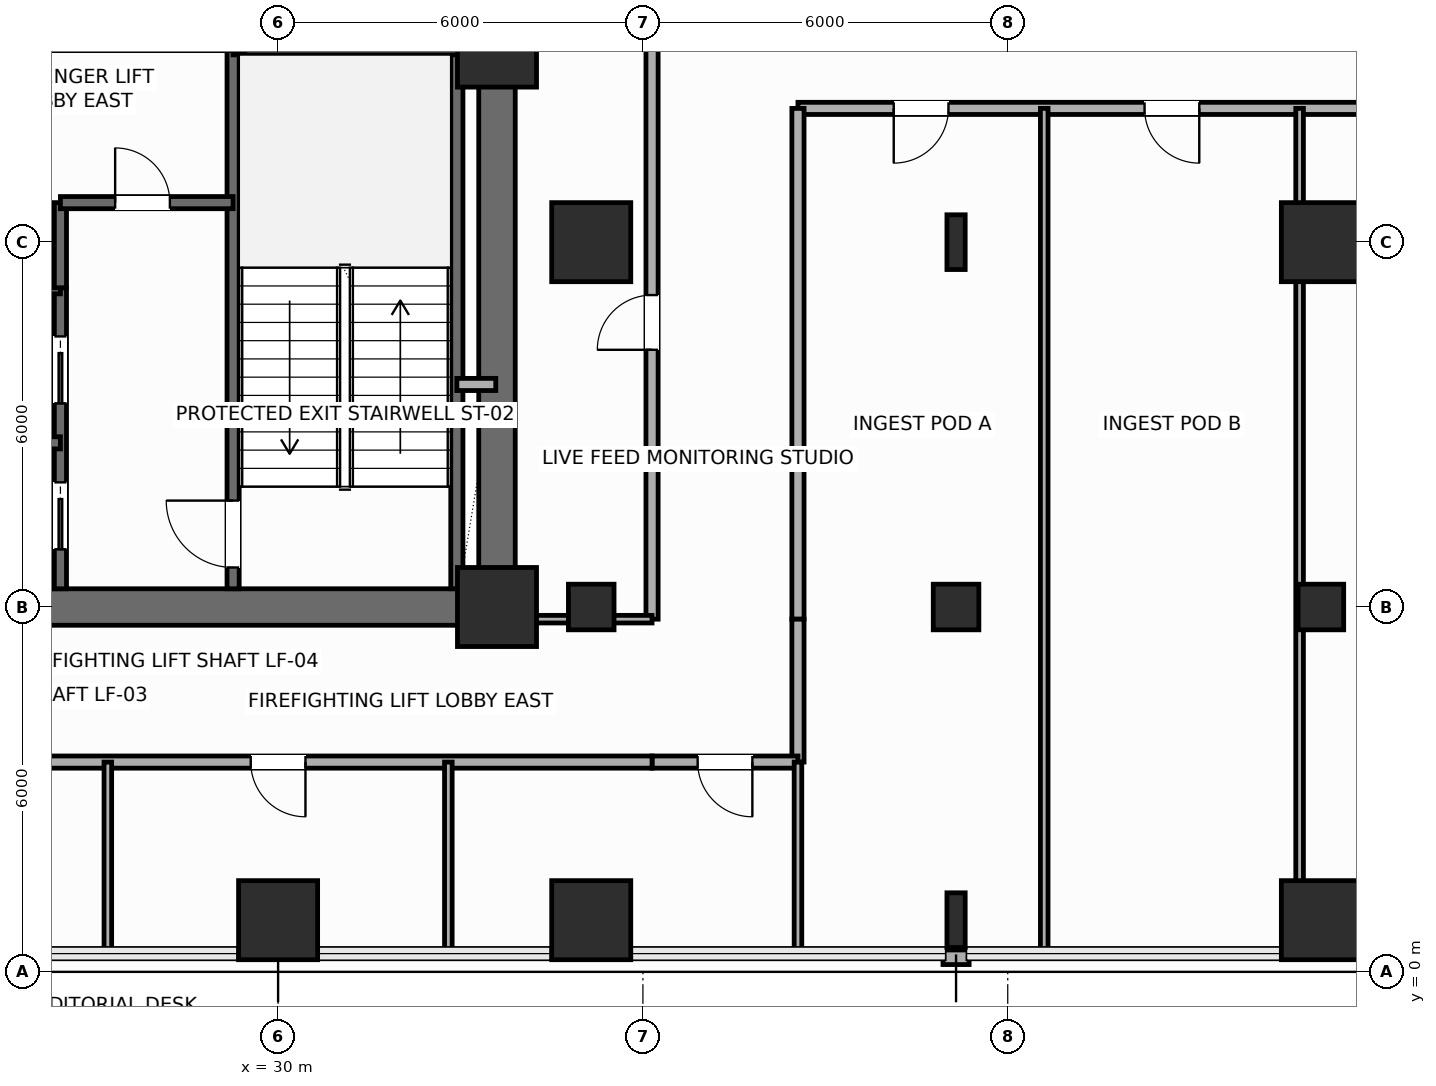
"""IFC4 building model, lengths in metres.
Left out: names, types, materials, properties, quantities, classifications, styles, units other than length and angle.
Written with IfcOpenShell. Run it as: python <this file> out.ifc"""

import sys

from ifc_helpers import new_model, si_unit, direction, frame, frame_2d, origin, origin_2d, place, context, subcontext, project, spatial, rectangle, hollow_rectangle, i_section, extrude, element, fill, save


model = new_model("IFC4")
c1 = context("Model", 3, precision=1e-05, world=origin(), true_north=direction((0.0, 1.0)))
c2 = subcontext(c1, "Body", "Model", "MODEL_VIEW")
j1 = project(units=[si_unit("LENGTHUNIT", "METRE"), si_unit("PLANEANGLEUNIT", "RADIAN")], contexts=[c1])
p1 = place(None, origin())
s1 = spatial("IfcSite", under=j1, at=p1, CompositionType="ELEMENT")
p2 = place(p1, origin())
s2 = spatial("IfcBuilding", under=s1, at=p2, CompositionType="ELEMENT")
p3 = place(p2, frame((0.0, 0.0, 48.0)))
s3 = spatial("IfcBuildingStorey", under=s2, at=p3, CompositionType="ELEMENT", Elevation=48.0)
for number, where, z_axis, x_axis in (
    (1, (33.6, 6.0, 0.0), (0.0, 0.0, 1.0), (1.0, 0.0, 0.0)),
    (2, (33.6, 15.2, 0.0), (0.0, 0.0, 1.0), (1.0, 0.0, 0.0)),
    (3, (30.0, 0.85, 0.0), (0.0, 0.0, 1.0), (1.0, 0.0, 0.0)),
    (4, (35.15, 0.85, 0.0), (0.0, 0.0, 1.0), (1.0, 0.0, 0.0)),
):
    element("IfcColumn", number, at=place(p3, frame(where, z_axis=z_axis, x_axis=x_axis)), inside=s3, PredefinedType="COLUMN", context=c2, shape_type="SweptSolid", body=[
        extrude(rectangle(XDim=1.3, YDim=1.3, at=origin_2d()), origin(), (0.0, 0.0, 1.0), 3.9),
    ])
p4 = place(p3, frame((35.15, 6.0, 0.0), z_axis=(0.0, 0.0, 1.0), x_axis=(1.0, 0.0, 0.0)))
e5 = element("IfcColumn", 5, at=p4, inside=s3, PredefinedType="COLUMN", context=c2, shape_type="SweptSolid", body=[
    extrude(hollow_rectangle(XDim=0.75, YDim=0.75, WallThickness=0.035, InnerFilletRadius=0.035, OuterFilletRadius=0.05, at=origin_2d()), origin(), (0.0, 0.0, 1.0), 3.9),
])
p5 = place(p3, frame((35.15, 12.0, 0.0), z_axis=(0.0, 0.0, 1.0), x_axis=(1.0, 0.0, 0.0)))
e6 = element("IfcColumn", 6, at=p5, inside=s3, PredefinedType="COLUMN", context=c2, shape_type="SweptSolid", body=[
    extrude(rectangle(XDim=1.3, YDim=1.3, at=origin_2d()), origin(), (0.0, 0.0, 1.0), 3.9),
])
p6 = place(p3, frame((41.15, 0.85, 0.0), z_axis=(0.0, 0.0, 1.0), x_axis=(1.0, 0.0, 0.0)))
e7 = element("IfcColumn", 7, at=p6, inside=s3, PredefinedType="COLUMN", context=c2, shape_type="SweptSolid", body=[
    extrude(i_section(OverallWidth=0.3, OverallDepth=0.9, WebThickness=0.019, FlangeThickness=0.035, FilletRadius=0.03, at=origin_2d()), origin(), (0.0, 0.0, 1.0), 3.9),
])
p7 = place(p3, frame((41.15, 6.0, 0.0), z_axis=(0.0, 0.0, 1.0), x_axis=(1.0, 0.0, 0.0)))
e8 = element("IfcColumn", 8, at=p7, inside=s3, PredefinedType="COLUMN", context=c2, shape_type="SweptSolid", body=[
    extrude(hollow_rectangle(XDim=0.75, YDim=0.75, WallThickness=0.035, InnerFilletRadius=0.035, OuterFilletRadius=0.05, at=origin_2d()), origin(), (0.0, 0.0, 1.0), 3.9),
])
p8 = place(p3, frame((41.15, 12.0, 0.0), z_axis=(0.0, 0.0, 1.0), x_axis=(1.0, 0.0, 0.0)))
e9 = element("IfcColumn", 9, at=p8, inside=s3, PredefinedType="COLUMN", context=c2, shape_type="SweptSolid", body=[
    extrude(i_section(OverallWidth=0.3, OverallDepth=0.9, WebThickness=0.019, FlangeThickness=0.035, FilletRadius=0.03, at=origin_2d()), origin(), (0.0, 0.0, 1.0), 3.9),
])
p9 = place(p3, frame((47.15, 0.85, 0.0), z_axis=(0.0, 0.0, 1.0), x_axis=(1.0, 0.0, 0.0)))
e10 = element("IfcColumn", 10, at=p9, inside=s3, PredefinedType="COLUMN", context=c2, shape_type="SweptSolid", body=[
    extrude(rectangle(XDim=1.3, YDim=1.3, at=origin_2d()), origin(), (0.0, 0.0, 1.0), 3.9),
])
p10 = place(p3, frame((47.15, 6.0, 0.0), z_axis=(0.0, 0.0, 1.0), x_axis=(1.0, 0.0, 0.0)))
e11 = element("IfcColumn", 11, at=p10, inside=s3, PredefinedType="COLUMN", context=c2, shape_type="SweptSolid", body=[
    extrude(hollow_rectangle(XDim=0.75, YDim=0.75, WallThickness=0.035, InnerFilletRadius=0.035, OuterFilletRadius=0.05, at=origin_2d()), origin(), (0.0, 0.0, 1.0), 3.9),
])
p11 = place(p3, frame((47.15, 12.0, 0.0), z_axis=(0.0, 0.0, 1.0), x_axis=(1.0, 0.0, 0.0)))
e12 = element("IfcColumn", 12, at=p11, inside=s3, PredefinedType="COLUMN", context=c2, shape_type="SweptSolid", body=[
    extrude(rectangle(XDim=1.3, YDim=1.3, at=origin_2d()), origin(), (0.0, 0.0, 1.0), 3.9),
])
p12 = place(p3, frame((41.365, 0.24, 0.0), z_axis=(0.0, 0.0, 1.0), x_axis=(-1.0, 0.0, 0.0)))
e13 = element("IfcWall", 13, at=p12, inside=s3, PredefinedType="SOLIDWALL", context=c2, shape_type="SweptSolid", body=[
    extrude(rectangle(XDim=0.43, YDim=0.24, at=frame_2d((0.215, 0.0))), origin(), (0.0, 0.0, 1.0), 3.65),
])
p13 = place(p3, frame((24.0, 6.0, 0.0), z_axis=(0.0, 0.0, 1.0), x_axis=(1.0, 0.0, 0.0)))
e14 = element("IfcWall", 14, at=p13, inside=s3, PredefinedType="SHEAR", context=c2, shape_type="SweptSolid", body=[
    extrude(rectangle(XDim=9.6, YDim=0.6, at=frame_2d((4.8, 0.0))), origin(), (0.0, 0.0, 1.0), 3.65),
])
p14 = place(p3, frame((33.6, 6.0, 0.0), z_axis=(0.0, 0.0, 1.0), x_axis=(0.0, 1.0, 0.0)))
e15 = element("IfcWall", 15, at=p14, inside=s3, PredefinedType="SHEAR", context=c2, shape_type="SweptSolid", body=[
    extrude(rectangle(XDim=12.0, YDim=0.6, at=frame_2d((6.0, 0.0))), origin(), (0.0, 0.0, 1.0), 3.65),
])
p15 = place(p14, frame((10.2, 0.0, 0.0)))
e16 = element("IfcOpeningElement", 16, at=p15, cuts=e15, PredefinedType="OPENING", context=c2, shape_type="SweptSolid", body=[
    extrude(rectangle(XDim=0.9, YDim=2.15, at=frame_2d((0.45, 1.075))), frame((0.0, 0.31, 0.0), z_axis=(0.0, -1.0, 0.0), x_axis=(1.0, 0.0, 0.0)), (0.0, 0.0, 1.0), 0.62),
])
p16 = place(p3, frame((29.26, 6.3, 0.0), z_axis=(0.0, 0.0, 1.0), x_axis=(0.0, 1.0, 0.0)))
e17 = element("IfcWall", 17, at=p16, inside=s3, PredefinedType="SHEAR", context=c2, shape_type="SweptSolid", body=[
    extrude(rectangle(XDim=8.88, YDim=0.2, at=frame_2d((4.44, 0.0))), origin(), (0.0, 0.0, 1.0), 3.65),
])
p17 = place(p16, frame((0.35, 0.0, 0.0)))
e18 = element("IfcOpeningElement", 18, at=p17, cuts=e17, PredefinedType="OPENING", context=c2, shape_type="SweptSolid", body=[
    extrude(rectangle(XDim=1.1, YDim=2.2, at=frame_2d((0.55, 1.1))), frame((0.0, 0.11, 0.0), z_axis=(0.0, -1.0, 0.0), x_axis=(1.0, 0.0, 0.0)), (0.0, 0.0, 1.0), 0.22),
])
p18 = place(p3, frame((32.94, 6.3, 0.0), z_axis=(0.0, 0.0, 1.0), x_axis=(0.0, 1.0, 0.0)))
e19 = element("IfcWall", 19, at=p18, inside=s3, PredefinedType="SHEAR", context=c2, shape_type="SweptSolid", body=[
    extrude(rectangle(XDim=8.88, YDim=0.2, at=frame_2d((4.44, 0.0))), origin(), (0.0, 0.0, 1.0), 3.65),
])
p19 = place(p3, frame((29.26, 15.18, 0.0), z_axis=(0.0, 0.0, 1.0), x_axis=(1.0, 0.0, 0.0)))
e20 = element("IfcWall", 20, at=p19, inside=s3, PredefinedType="SHEAR", context=c2, shape_type="SweptSolid", body=[
    extrude(rectangle(XDim=4.04, YDim=0.2, at=frame_2d((2.02, 0.0))), origin(), (0.0, 0.0, 1.0), 3.65),
])
p20 = place(p3, frame((26.42, 6.3, 0.0), z_axis=(0.0, 0.0, 1.0), x_axis=(0.0, 1.0, 0.0)))
e21 = element("IfcWall", 21, at=p20, inside=s3, PredefinedType="SHEAR", context=c2, shape_type="SweptSolid", body=[
    extrude(rectangle(XDim=4.95, YDim=0.2, at=frame_2d((2.475, 0.0))), origin(), (0.0, 0.0, 1.0), 3.65),
])
p21 = place(p20, frame((0.65, 0.0, 0.0)))
e22 = element("IfcOpeningElement", 22, at=p21, cuts=e21, PredefinedType="OPENING", context=c2, shape_type="SweptSolid", body=[
    extrude(rectangle(XDim=1.1, YDim=2.2, at=frame_2d((0.55, 1.1))), frame((0.0, 0.11, 0.0), z_axis=(0.0, -1.0, 0.0), x_axis=(1.0, 0.0, 0.0)), (0.0, 0.0, 1.0), 0.22),
])
p22 = place(p20, frame((3.05, 0.0, 0.0)))
e23 = element("IfcOpeningElement", 23, at=p22, cuts=e21, PredefinedType="OPENING", context=c2, shape_type="SweptSolid", body=[
    extrude(rectangle(XDim=1.1, YDim=2.2, at=frame_2d((0.55, 1.1))), frame((0.0, 0.11, 0.0), z_axis=(0.0, -1.0, 0.0), x_axis=(1.0, 0.0, 0.0)), (0.0, 0.0, 1.0), 0.22),
])
for number, where, z_axis, x_axis in (
    (24, (24.25, 8.7, 0.0), (0.0, 0.0, 1.0), (1.0, 0.0, 0.0)),
    (25, (24.25, 11.25, 0.0), (0.0, 0.0, 1.0), (1.0, 0.0, 0.0)),
):
    element("IfcWall", number, at=place(p3, frame(where, z_axis=z_axis, x_axis=x_axis)), inside=s3, PredefinedType="SHEAR", context=c2, shape_type="SweptSolid", body=[
        extrude(rectangle(XDim=2.17, YDim=0.2, at=frame_2d((1.085, 0.0))), origin(), (0.0, 0.0, 1.0), 3.65),
    ])
p23 = place(p3, frame((26.42, 11.25, 0.0), z_axis=(0.0, 0.0, 1.0), x_axis=(0.0, 1.0, 0.0)))
e26 = element("IfcWall", 26, at=p23, inside=s3, PredefinedType="SHEAR", context=c2, shape_type="SweptSolid", body=[
    extrude(rectangle(XDim=1.4, YDim=0.2, at=frame_2d((0.7, 0.0))), origin(), (0.0, 0.0, 1.0), 3.65),
])
p24 = place(p3, frame((26.42, 12.65, 0.0), z_axis=(0.0, 0.0, 1.0), x_axis=(1.0, 0.0, 0.0)))
e27 = element("IfcWall", 27, at=p24, inside=s3, PredefinedType="SHEAR", context=c2, shape_type="SweptSolid", body=[
    extrude(rectangle(XDim=2.84, YDim=0.2, at=frame_2d((1.42, 0.0))), origin(), (0.0, 0.0, 1.0), 3.65),
])
p25 = place(p24, frame((0.9, 0.0, 0.0)))
e28 = element("IfcOpeningElement", 28, at=p25, cuts=e27, PredefinedType="OPENING", context=c2, shape_type="SweptSolid", body=[
    extrude(rectangle(XDim=0.9, YDim=2.15, at=frame_2d((0.45, 1.075))), frame((0.0, 0.11, 0.0), z_axis=(0.0, -1.0, 0.0), x_axis=(1.0, 0.0, 0.0)), (0.0, 0.0, 1.0), 0.22),
])
p26 = place(p3, frame((32.94, 9.66, 0.0), z_axis=(0.0, 0.0, 1.0), x_axis=(1.0, 0.0, 0.0)))
e29 = element("IfcWall", 29, at=p26, inside=s3, PredefinedType="SOLIDWALL", context=c2, shape_type="SweptSolid", body=[
    extrude(rectangle(XDim=0.64, YDim=0.2, at=frame_2d((0.32, 0.0))), origin(), (0.0, 0.0, 1.0), 3.65),
])
p27 = place(p3, frame((36.15, 5.8, 0.0), z_axis=(0.0, 0.0, 1.0), x_axis=(0.0, 1.0, 0.0)))
e30 = element("IfcWall", 30, at=p27, inside=s3, PredefinedType="PARTITIONING", context=c2, shape_type="SweptSolid", body=[
    extrude(rectangle(XDim=10.08, YDim=0.2, at=frame_2d((5.04, 0.0))), origin(), (0.0, 0.0, 1.0), 3.65),
])
p28 = place(p27, frame((4.43, 0.0, 0.0)))
e31 = element("IfcOpeningElement", 31, at=p28, cuts=e30, PredefinedType="OPENING", context=c2, shape_type="SweptSolid", body=[
    extrude(rectangle(XDim=0.9, YDim=2.1, at=frame_2d((0.45, 1.05))), frame((0.0, 0.11, 0.0), z_axis=(0.0, -1.0, 0.0), x_axis=(1.0, 0.0, 0.0)), (0.0, 0.0, 1.0), 0.22),
])
p29 = place(p3, frame((50.9, 14.2, 0.0), z_axis=(0.0, 0.0, 1.0), x_axis=(-1.0, 0.0, 0.0)))
e32 = element("IfcWall", 32, at=p29, inside=s3, PredefinedType="PARTITIONING", context=c2, shape_type="SweptSolid", body=[
    extrude(rectangle(XDim=12.35, YDim=0.2, at=frame_2d((6.175, 0.0))), origin(), (0.0, 0.0, 1.0), 3.65),
])
p30 = place(p29, frame((9.875, 0.0, 0.0)))
e33 = element("IfcOpeningElement", 33, at=p30, cuts=e32, PredefinedType="OPENING", context=c2, shape_type="SweptSolid", body=[
    extrude(rectangle(XDim=0.9, YDim=2.1, at=frame_2d((0.45, 1.05))), frame((0.0, 0.11, 0.0), z_axis=(0.0, -1.0, 0.0), x_axis=(1.0, 0.0, 0.0)), (0.0, 0.0, 1.0), 0.22),
])
p31 = place(p29, frame((5.75, 0.0, 0.0)))
e34 = element("IfcOpeningElement", 34, at=p31, cuts=e32, PredefinedType="OPENING", context=c2, shape_type="SweptSolid", body=[
    extrude(rectangle(XDim=0.9, YDim=2.1, at=frame_2d((0.45, 1.05))), frame((0.0, 0.11, 0.0), z_axis=(0.0, -1.0, 0.0), x_axis=(1.0, 0.0, 0.0)), (0.0, 0.0, 1.0), 0.22),
])
p32 = place(p29, frame((1.6, 0.0, 0.0)))
e35 = element("IfcOpeningElement", 35, at=p32, cuts=e32, PredefinedType="OPENING", context=c2, shape_type="SweptSolid", body=[
    extrude(rectangle(XDim=0.9, YDim=2.1, at=frame_2d((0.45, 1.05))), frame((0.0, 0.11, 0.0), z_axis=(0.0, -1.0, 0.0), x_axis=(1.0, 0.0, 0.0)), (0.0, 0.0, 1.0), 0.22),
])
p33 = place(p3, frame((38.55, 14.2, 0.0), z_axis=(0.0, 0.0, 1.0), x_axis=(0.0, -1.0, 0.0)))
e36 = element("IfcWall", 36, at=p33, inside=s3, PredefinedType="PARTITIONING", context=c2, shape_type="SweptSolid", body=[
    extrude(rectangle(XDim=8.4, YDim=0.2, at=frame_2d((4.2, 0.0))), origin(), (0.0, 0.0, 1.0), 3.65),
])
p34 = place(p3, frame((38.55, 5.8, 0.0), z_axis=(0.0, 0.0, 1.0), x_axis=(0.0, -1.0, 0.0)))
e37 = element("IfcWall", 37, at=p34, inside=s3, PredefinedType="PARTITIONING", context=c2, shape_type="SweptSolid", body=[
    extrude(rectangle(XDim=2.35, YDim=0.2, at=frame_2d((1.175, 0.0))), origin(), (0.0, 0.0, 1.0), 3.65),
])
p35 = place(p3, frame((38.55, 3.45, 0.0), z_axis=(0.0, 0.0, 1.0), x_axis=(-1.0, 0.0, 0.0)))
e38 = element("IfcWall", 38, at=p35, inside=s3, PredefinedType="PARTITIONING", context=c2, shape_type="SweptSolid", body=[
    extrude(rectangle(XDim=2.4, YDim=0.2, at=frame_2d((1.2, 0.0))), origin(), (0.0, 0.0, 1.0), 3.142),
])
p36 = place(p35, frame((0.75, 0.0, 0.0)))
e39 = element("IfcOpeningElement", 39, at=p36, cuts=e38, PredefinedType="OPENING", context=c2, shape_type="SweptSolid", body=[
    extrude(rectangle(XDim=0.9, YDim=2.1, at=frame_2d((0.45, 1.05))), frame((0.0, 0.11, 0.0), z_axis=(0.0, -1.0, 0.0), x_axis=(1.0, 0.0, 0.0)), (0.0, 0.0, 1.0), 0.22),
])
p37 = place(p3, frame((36.15, 3.45, 0.0), z_axis=(0.0, 0.0, 1.0), x_axis=(-1.0, 0.0, 0.0)))
e40 = element("IfcWall", 40, at=p37, inside=s3, PredefinedType="PARTITIONING", context=c2, shape_type="SweptSolid", body=[
    extrude(rectangle(XDim=14.6, YDim=0.2, at=frame_2d((7.3, 0.0))), origin(), (0.0, 0.0, 1.0), 3.142),
])
p38 = place(p37, frame((11.325, 0.0, 0.0)))
e41 = element("IfcOpeningElement", 41, at=p38, cuts=e40, PredefinedType="OPENING", context=c2, shape_type="SweptSolid", body=[
    extrude(rectangle(XDim=0.9, YDim=2.1, at=frame_2d((0.45, 1.05))), frame((0.0, 0.11, 0.0), z_axis=(0.0, -1.0, 0.0), x_axis=(1.0, 0.0, 0.0)), (0.0, 0.0, 1.0), 0.22),
])
p39 = place(p37, frame((5.7, 0.0, 0.0)))
e42 = element("IfcOpeningElement", 42, at=p39, cuts=e40, PredefinedType="OPENING", context=c2, shape_type="SweptSolid", body=[
    extrude(rectangle(XDim=0.9, YDim=2.1, at=frame_2d((0.45, 1.05))), frame((0.0, 0.11, 0.0), z_axis=(0.0, -1.0, 0.0), x_axis=(1.0, 0.0, 0.0)), (0.0, 0.0, 1.0), 0.22),
])
for number, where, z_axis, x_axis in (
    (43, (42.6, 0.3, 0.0), (0.0, 0.0, 1.0), (0.0, 1.0, 0.0)),
    (44, (46.8, 0.3, 0.0), (0.0, 0.0, 1.0), (0.0, 1.0, 0.0)),
):
    element("IfcWall", number, at=place(p3, frame(where, z_axis=z_axis, x_axis=x_axis)), inside=s3, PredefinedType="PARTITIONING", context=c2, shape_type="SweptSolid", body=[
        extrude(rectangle(XDim=13.9, YDim=0.125, at=frame_2d((6.95, 0.0))), origin(), (0.0, 0.0, 1.0), 3.65),
    ])
p40 = place(p3, frame((46.8, 0.3, 0.0), z_axis=(0.0, 0.0, 1.0), x_axis=(0.999973308199, 0.007306359489, 0.0)))
e45 = element("IfcWall", 45, at=p40, inside=s3, PredefinedType="PARTITIONING", context=c2, shape_type="SweptSolid", body=[
    extrude(rectangle(XDim=6.85, YDim=0.125, at=frame_2d((3.425, 0.0))), origin(), (0.0, 0.0, 1.0), 3.65),
])
for number, where, z_axis, x_axis in (
    (46, (27.2, 0.3, 0.0), (0.0, 0.0, 1.0), (0.0, 1.0, 0.0)),
    (47, (32.8, 0.3, 0.0), (0.0, 0.0, 1.0), (0.0, 1.0, 0.0)),
    (48, (38.55, 0.3, 0.0), (0.0, 0.0, 1.0), (0.0, 1.0, 0.0)),
):
    element("IfcWall", number, at=place(p3, frame(where, z_axis=z_axis, x_axis=x_axis)), inside=s3, PredefinedType="PARTITIONING", context=c2, shape_type="SweptSolid", body=[
        extrude(rectangle(XDim=3.15, YDim=0.125, at=frame_2d((1.575, 0.0))), origin(), (0.0, 0.0, 1.0), 3.65),
    ])
p41 = place(p3, frame((33.65, 5.8, 0.0), z_axis=(0.0, 0.0, 1.0), x_axis=(1.0, 0.0, 0.0)))
e49 = element("IfcWall", 49, at=p41, inside=s3, PredefinedType="PARTITIONING", context=c2, shape_type="SweptSolid", body=[
    extrude(rectangle(XDim=2.5, YDim=0.125, at=frame_2d((1.25, 0.0))), origin(), (0.0, 0.0, 1.0), 2.992),
])
p42 = place(p17, origin())
e50 = element("IfcDoor", 50, at=p42, inside=s3, OperationType="SINGLE_SWING_RIGHT", PredefinedType="DOOR", context=c2, shape_type="SweptSolid", body=[
    extrude(rectangle(XDim=1.1, YDim=2.2, at=frame_2d((0.55, 1.1))), frame((0.0, 0.025, 0.0), z_axis=(0.0, -1.0, 0.0), x_axis=(1.0, 0.0, 0.0)), (0.0, 0.0, 1.0), 0.05),
])
fill(e18, e50)
p43 = place(p21, origin())
e51 = element("IfcDoor", 51, at=p43, inside=s3, OperationType="SLIDING_TO_LEFT", PredefinedType="DOOR", context=c2, shape_type="SweptSolid", body=[
    extrude(rectangle(XDim=1.1, YDim=2.2, at=frame_2d((0.55, 1.1))), frame((0.0, 0.025, 0.0), z_axis=(0.0, -1.0, 0.0), x_axis=(1.0, 0.0, 0.0)), (0.0, 0.0, 1.0), 0.05),
])
fill(e22, e51)
p44 = place(p22, origin())
e52 = element("IfcDoor", 52, at=p44, inside=s3, OperationType="SLIDING_TO_LEFT", PredefinedType="DOOR", context=c2, shape_type="SweptSolid", body=[
    extrude(rectangle(XDim=1.1, YDim=2.2, at=frame_2d((0.55, 1.1))), frame((0.0, 0.025, 0.0), z_axis=(0.0, -1.0, 0.0), x_axis=(1.0, 0.0, 0.0)), (0.0, 0.0, 1.0), 0.05),
])
fill(e23, e52)
p45 = place(p25, origin())
e53 = element("IfcDoor", 53, at=p45, inside=s3, OperationType="SINGLE_SWING_LEFT", PredefinedType="DOOR", context=c2, shape_type="SweptSolid", body=[
    extrude(rectangle(XDim=0.9, YDim=2.15, at=frame_2d((0.45, 1.075))), frame((0.0, 0.025, 0.0), z_axis=(0.0, -1.0, 0.0), x_axis=(1.0, 0.0, 0.0)), (0.0, 0.0, 1.0), 0.05),
])
fill(e28, e53)
p46 = place(p28, origin())
e54 = element("IfcDoor", 54, at=p46, inside=s3, OperationType="SINGLE_SWING_LEFT", PredefinedType="DOOR", context=c2, shape_type="SweptSolid", body=[
    extrude(rectangle(XDim=0.9, YDim=2.1, at=frame_2d((0.45, 1.05))), frame((0.0, 0.025, 0.0), z_axis=(0.0, -1.0, 0.0), x_axis=(1.0, 0.0, 0.0)), (0.0, 0.0, 1.0), 0.05),
])
fill(e31, e54)
p47 = place(p30, origin())
e55 = element("IfcDoor", 55, at=p47, inside=s3, OperationType="SINGLE_SWING_RIGHT", PredefinedType="DOOR", context=c2, shape_type="SweptSolid", body=[
    extrude(rectangle(XDim=0.9, YDim=2.1, at=frame_2d((0.45, 1.05))), frame((0.0, 0.025, 0.0), z_axis=(0.0, -1.0, 0.0), x_axis=(1.0, 0.0, 0.0)), (0.0, 0.0, 1.0), 0.05),
])
fill(e33, e55)
p48 = place(p31, origin())
e56 = element("IfcDoor", 56, at=p48, inside=s3, OperationType="SINGLE_SWING_LEFT", PredefinedType="DOOR", context=c2, shape_type="SweptSolid", body=[
    extrude(rectangle(XDim=0.9, YDim=2.1, at=frame_2d((0.45, 1.05))), frame((0.0, 0.025, 0.0), z_axis=(0.0, -1.0, 0.0), x_axis=(1.0, 0.0, 0.0)), (0.0, 0.0, 1.0), 0.05),
])
fill(e34, e56)
p49 = place(p36, origin())
e57 = element("IfcDoor", 57, at=p49, inside=s3, OperationType="SINGLE_SWING_LEFT", PredefinedType="DOOR", context=c2, shape_type="SweptSolid", body=[
    extrude(rectangle(XDim=0.9, YDim=2.1, at=frame_2d((0.45, 1.05))), frame((0.0, 0.025, 0.0), z_axis=(0.0, -1.0, 0.0), x_axis=(1.0, 0.0, 0.0)), (0.0, 0.0, 1.0), 0.05),
])
fill(e39, e57)
p50 = place(p39, origin())
e58 = element("IfcDoor", 58, at=p50, inside=s3, OperationType="SINGLE_SWING_LEFT", PredefinedType="DOOR", context=c2, shape_type="SweptSolid", body=[
    extrude(rectangle(XDim=0.9, YDim=2.1, at=frame_2d((0.45, 1.05))), frame((0.0, 0.025, 0.0), z_axis=(0.0, -1.0, 0.0), x_axis=(1.0, 0.0, 0.0)), (0.0, 0.0, 1.0), 0.05),
])
fill(e42, e58)
save(model, sys.argv[1])
